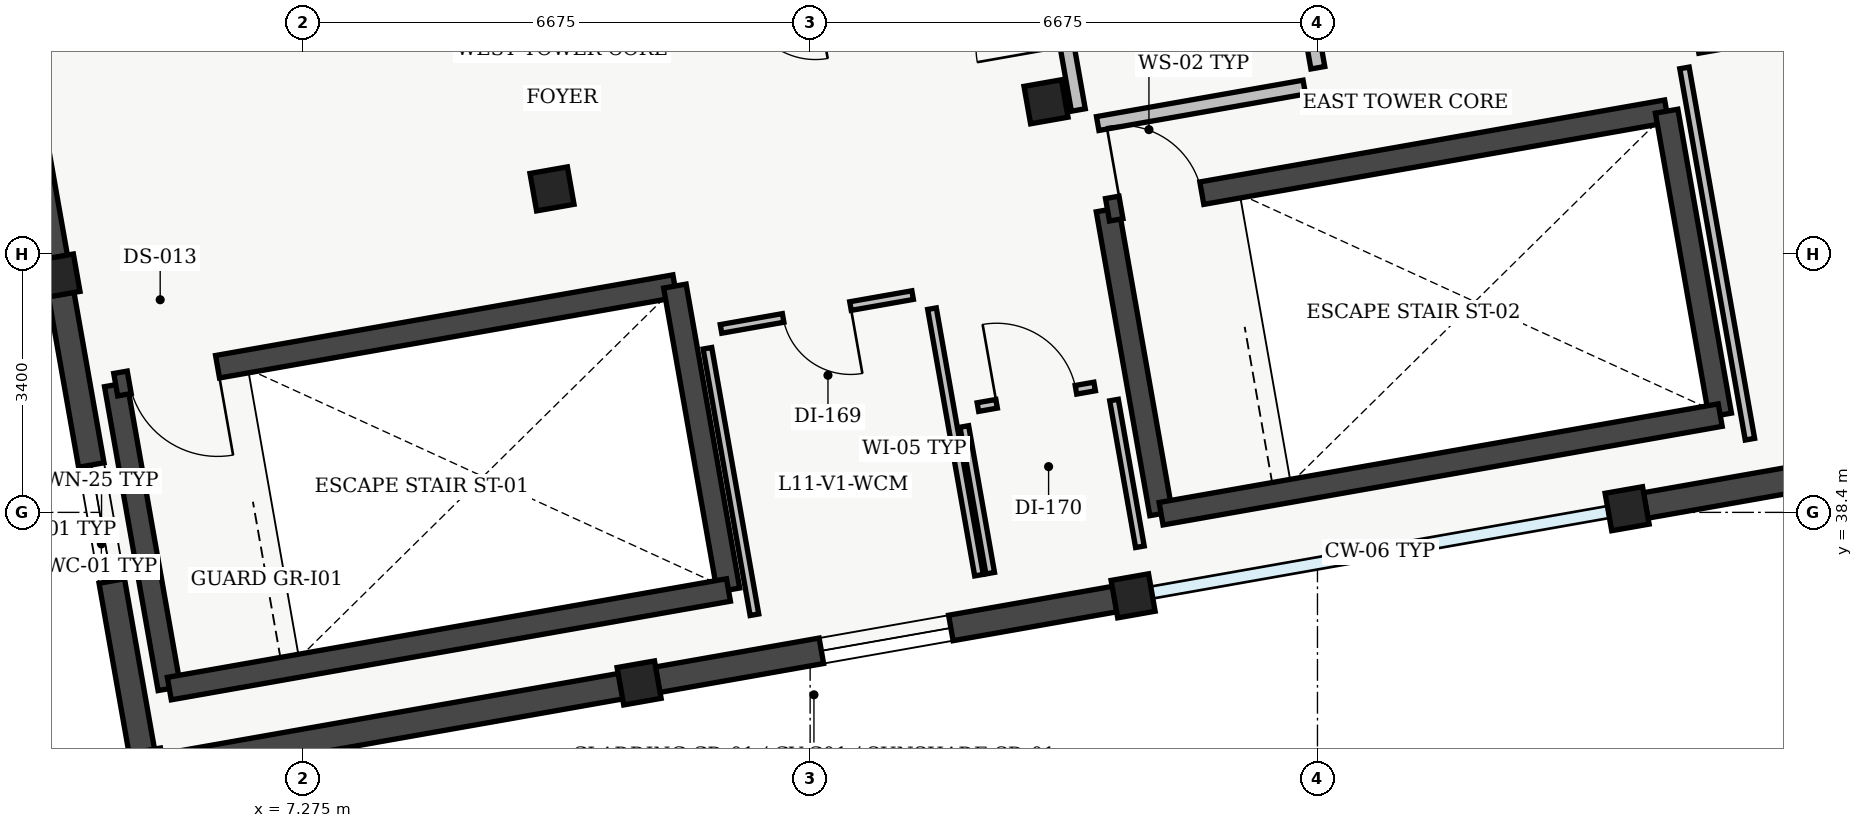
"""IFC4 building model, lengths in metres.
Left out: names, types, materials, properties, quantities, classifications, styles, units other than length and angle.
Written with IfcOpenShell. Run it as: python <this file> out.ifc"""

import sys

from ifc_helpers import new_model, si_unit, direction, frame, frame_2d, origin, origin_2d, place, context, subcontext, project, spatial, polyline, rectangle, outline, extrude, element, fill, save


model = new_model("IFC4")
c1 = context("Model", 3, precision=1e-05, world=origin(), true_north=direction((0.0, 1.0)))
c2 = subcontext(c1, "Body", "Model", "MODEL_VIEW")
j1 = project(units=[si_unit("LENGTHUNIT", "METRE"), si_unit("PLANEANGLEUNIT", "RADIAN")], contexts=[c1])
p1 = place(None, origin())
s1 = spatial("IfcSite", under=j1, at=p1, CompositionType="ELEMENT")
p2 = place(p1, origin())
s2 = spatial("IfcBuilding", under=s1, at=p2, CompositionType="ELEMENT")
p3 = place(p2, frame((0.0, 0.0, 49.2)))
s3 = spatial("IfcBuildingStorey", under=s2, at=p3, CompositionType="ELEMENT", Elevation=49.2)
p4 = place(p3, frame((4.054, 41.51, 0.0), z_axis=(0.0, 0.0, 1.0), x_axis=(0.984807753012, 0.173648177667, 0.0)))
e1 = element("IfcColumn", 1, at=p4, inside=s3, PredefinedType="COLUMN", context=c2, shape_type="SweptSolid", body=[
    extrude(rectangle(XDim=0.5, YDim=0.5, at=origin_2d()), origin(), (0.0, 0.0, 1.0), 4.2),
])
p5 = place(p3, frame((11.7, 36.156, 0.0), z_axis=(0.0, 0.0, 1.0), x_axis=(0.984807753012, 0.173648177667, 0.0)))
e2 = element("IfcColumn", 2, at=p5, inside=s3, PredefinedType="COLUMN", context=c2, shape_type="SweptSolid", body=[
    extrude(rectangle(XDim=0.5, YDim=0.5, at=origin_2d()), origin(), (0.0, 0.0, 1.0), 3.985),
])
p6 = place(p3, frame((10.554, 42.656, 0.0), z_axis=(0.0, 0.0, 1.0), x_axis=(0.984807753012, 0.173648177667, 0.0)))
e3 = element("IfcColumn", 3, at=p6, inside=s3, PredefinedType="COLUMN", context=c2, shape_type="SweptSolid", body=[
    extrude(rectangle(XDim=0.5, YDim=0.5, at=origin_2d()), origin(), (0.0, 0.0, 1.0), 4.2),
])
p7 = place(p3, frame((18.199, 37.302, 0.0), z_axis=(0.0, 0.0, 1.0), x_axis=(0.984807753012, 0.173648177667, 0.0)))
e4 = element("IfcColumn", 4, at=p7, inside=s3, PredefinedType="COLUMN", context=c2, shape_type="SweptSolid", body=[
    extrude(rectangle(XDim=0.5, YDim=0.5, at=origin_2d()), origin(), (0.0, 0.0, 1.0), 3.985),
])
p8 = place(p3, frame((17.053, 43.802, 0.0), z_axis=(0.0, 0.0, 1.0), x_axis=(0.984807753012, 0.173648177667, 0.0)))
e5 = element("IfcColumn", 5, at=p8, inside=s3, PredefinedType="COLUMN", context=c2, shape_type="SweptSolid", body=[
    extrude(rectangle(XDim=0.5, YDim=0.5, at=origin_2d()), origin(), (0.0, 0.0, 1.0), 4.2),
])
p9 = place(p3, frame((24.699, 38.448, 0.0), z_axis=(0.0, 0.0, 1.0), x_axis=(0.984807753012, 0.173648177667, 0.0)))
e6 = element("IfcColumn", 6, at=p9, inside=s3, PredefinedType="COLUMN", context=c2, shape_type="SweptSolid", body=[
    extrude(rectangle(XDim=0.5, YDim=0.5, at=origin_2d()), origin(), (0.0, 0.0, 1.0), 3.985),
])
p10 = place(p3, frame((5.157, 35.251, 0.0), z_axis=(0.0, 0.0, 1.0), x_axis=(-0.173650847905, 0.984807282173, 0.0)))
e7 = element("IfcWall", 7, at=p10, inside=s3, PredefinedType="SOLIDWALL", context=c2, shape_type="SweptSolid", body=[
    extrude(outline(polyline([(0.0, 0.0), (6.11, 0.0), (6.11, 5.234), (0.0, 4.0), (0.0, 0.0)])), frame((0.0, 0.17, 0.0), z_axis=(0.0, -1.0, 0.0), x_axis=(1.0, 0.0, 0.0)), (0.0, 0.0, 1.0), 0.34),
])
p11 = place(p10, frame((2.28, 0.0, 0.95)))
e8 = element("IfcOpeningElement", 8, at=p11, cuts=e7, PredefinedType="OPENING", context=c2, shape_type="SweptSolid", body=[
    extrude(rectangle(XDim=1.55, YDim=1.46, at=frame_2d((0.775, 0.73))), frame((0.0, 0.17, 0.0), z_axis=(0.0, -1.0, 0.0), x_axis=(1.0, 0.0, 0.0)), (0.0, 0.0, 1.0), 0.34),
])
p12 = place(p3, frame((4.011, 41.751, 0.0), z_axis=(0.0, 0.0, 1.0), x_axis=(-0.173657681232, 0.98480607723, 0.0)))
e9 = element("IfcWall", 9, at=p12, inside=s3, PredefinedType="SOLIDWALL", context=c2, shape_type="SweptSolid", body=[
    extrude(outline(polyline([(0.0, 0.0), (6.11, 0.0), (6.11, 6.567), (0.0, 5.333), (0.0, 0.0)])), frame((0.0, 0.17, 0.0), z_axis=(0.0, -1.0, 0.0), x_axis=(1.0, 0.0, 0.0)), (0.0, 0.0, 1.0), 0.34),
])
p13 = place(p12, frame((2.235, 0.0, 0.95)))
e10 = element("IfcOpeningElement", 10, at=p13, cuts=e9, PredefinedType="OPENING", context=c2, shape_type="SweptSolid", body=[
    extrude(rectangle(XDim=1.64, YDim=1.48, at=frame_2d((0.82, 0.74))), frame((0.0, 0.17, 0.0), z_axis=(0.0, -1.0, 0.0), x_axis=(1.0, 0.0, 0.0)), (0.0, 0.0, 1.0), 0.34),
])
p14 = place(p3, frame((30.958, 39.552, 0.0), z_axis=(0.0, 0.0, 1.0), x_axis=(-0.984807282173, -0.173650847905, 0.0)))
e11 = element("IfcWall", 11, at=p14, inside=s3, PredefinedType="SOLIDWALL", context=c2, shape_type="SweptSolid", body=[
    extrude(rectangle(XDim=6.11, YDim=0.34, at=frame_2d((3.055, 0.0))), origin(), (0.0, 0.0, 1.0), 3.47),
])
p15 = place(p14, frame((2.1, 0.0, 0.95)))
e12 = element("IfcOpeningElement", 12, at=p15, cuts=e11, PredefinedType="OPENING", context=c2, shape_type="SweptSolid", body=[
    extrude(rectangle(XDim=1.91, YDim=1.4, at=frame_2d((0.955, 0.7))), frame((0.0, 0.17, 0.0), z_axis=(0.0, -1.0, 0.0), x_axis=(1.0, 0.0, 0.0)), (0.0, 0.0, 1.0), 0.34),
])
p16 = place(p3, frame((17.958, 37.26, 0.0), z_axis=(0.0, 0.0, 1.0), x_axis=(-0.98481411452, -0.173612095898, 0.0)))
e13 = element("IfcWall", 13, at=p16, inside=s3, PredefinedType="SOLIDWALL", context=c2, shape_type="SweptSolid", body=[
    extrude(rectangle(XDim=6.11, YDim=0.34, at=frame_2d((3.055, 0.0))), origin(), (0.0, 0.0, 1.0), 3.47),
])
p17 = place(p16, frame((2.19, 0.0, 0.95)))
e14 = element("IfcOpeningElement", 14, at=p17, cuts=e13, PredefinedType="OPENING", context=c2, shape_type="SweptSolid", body=[
    extrude(rectangle(XDim=1.73, YDim=1.36, at=frame_2d((0.865, 0.68))), frame((0.0, 0.17, 0.0), z_axis=(0.0, -1.0, 0.0), x_axis=(1.0, 0.0, 0.0)), (0.0, 0.0, 1.0), 0.34),
])
p18 = place(p3, frame((11.458, 36.114, 0.0), z_axis=(0.0, 0.0, 1.0), x_axis=(-0.984807282173, -0.173650847905, 0.0)))
e15 = element("IfcWall", 15, at=p18, inside=s3, PredefinedType="SOLIDWALL", context=c2, shape_type="SweptSolid", body=[
    extrude(rectangle(XDim=6.11, YDim=0.34, at=frame_2d((3.055, 0.0))), origin(), (0.0, 0.0, 1.0), 3.47),
])
p19 = place(p3, frame((5.519, 36.082, 0.0), z_axis=(0.0, 0.0, 1.0), x_axis=(-0.173665267602, 0.984804739443, 0.0)))
e16 = element("IfcWall", 16, at=p19, inside=s3, PredefinedType="SHEAR", context=c2, shape_type="SweptSolid", body=[
    extrude(rectangle(XDim=4.06, YDim=0.3, at=frame_2d((2.03, 0.0))), origin(), (0.0, 0.0, 1.0), 3.98),
])
p20 = place(p3, frame((4.814, 40.08, 0.0), z_axis=(0.0, 0.0, 1.0), x_axis=(0.984802636214, 0.173677193974, 0.0)))
e17 = element("IfcWall", 17, at=p20, inside=s3, PredefinedType="SHEAR", context=c2, shape_type="SweptSolid", body=[
    extrude(rectangle(XDim=7.47, YDim=0.3, at=frame_2d((3.735, 0.0))), origin(), (0.0, 0.0, 1.0), 3.98),
])
p21 = place(p20, frame((0.18, 0.0, 0.0)))
e18 = element("IfcOpeningElement", 18, at=p21, cuts=e17, PredefinedType="OPENING", context=c2, shape_type="SweptSolid", body=[
    extrude(rectangle(XDim=1.18, YDim=2.15, at=frame_2d((0.59, 1.075))), frame((0.0, 0.15, 0.0), z_axis=(0.0, -1.0, 0.0), x_axis=(1.0, 0.0, 0.0)), (0.0, 0.0, 1.0), 0.3),
])
p22 = place(p3, frame((12.17, 41.377, 0.0), z_axis=(0.0, 0.0, 1.0), x_axis=(0.173654983803, -0.984806552883, 0.0)))
e19 = element("IfcWall", 19, at=p22, inside=s3, PredefinedType="SHEAR", context=c2, shape_type="SweptSolid", body=[
    extrude(rectangle(XDim=4.06, YDim=0.3, at=frame_2d((2.03, 0.0))), origin(), (0.0, 0.0, 1.0), 3.98),
])
p23 = place(p3, frame((12.875, 37.379, 0.0), z_axis=(0.0, 0.0, 1.0), x_axis=(-0.984808225754, -0.173645496596, 0.0)))
e20 = element("IfcWall", 20, at=p23, inside=s3, PredefinedType="SHEAR", context=c2, shape_type="SweptSolid", body=[
    extrude(rectangle(XDim=7.47, YDim=0.3, at=frame_2d((3.735, 0.0))), origin(), (0.0, 0.0, 1.0), 3.98),
])
p24 = place(p3, frame((18.567, 38.383, 0.0), z_axis=(0.0, 0.0, 1.0), x_axis=(-0.173606946886, 0.984815022221, 0.0)))
e21 = element("IfcWall", 21, at=p24, inside=s3, PredefinedType="SHEAR", context=c2, shape_type="SweptSolid", body=[
    extrude(rectangle(XDim=4.06, YDim=0.3, at=frame_2d((2.03, 0.0))), origin(), (0.0, 0.0, 1.0), 3.98),
])
p25 = place(p3, frame((17.863, 42.381, 0.0), z_axis=(0.0, 0.0, 1.0), x_axis=(0.984808225754, 0.173645496596, 0.0)))
e22 = element("IfcWall", 22, at=p25, inside=s3, PredefinedType="SHEAR", context=c2, shape_type="SweptSolid", body=[
    extrude(rectangle(XDim=7.47, YDim=0.3, at=frame_2d((3.735, 0.0))), origin(), (0.0, 0.0, 1.0), 3.98),
])
p26 = place(p25, frame((0.18, 0.0, 0.0)))
e23 = element("IfcOpeningElement", 23, at=p26, cuts=e22, PredefinedType="OPENING", context=c2, shape_type="SweptSolid", body=[
    extrude(rectangle(XDim=1.08, YDim=2.15, at=frame_2d((0.54, 1.075))), frame((0.0, 0.15, 0.0), z_axis=(0.0, -1.0, 0.0), x_axis=(1.0, 0.0, 0.0)), (0.0, 0.0, 1.0), 0.3),
])
p27 = place(p3, frame((25.219, 43.678, 0.0), z_axis=(0.0, 0.0, 1.0), x_axis=(0.173665267602, -0.984804739443, 0.0)))
e24 = element("IfcWall", 24, at=p27, inside=s3, PredefinedType="SHEAR", context=c2, shape_type="SweptSolid", body=[
    extrude(rectangle(XDim=4.06, YDim=0.3, at=frame_2d((2.03, 0.0))), origin(), (0.0, 0.0, 1.0), 3.98),
])
p28 = place(p3, frame((25.924, 39.68, 0.0), z_axis=(0.0, 0.0, 1.0), x_axis=(-0.984809211193, -0.173639907711, 0.0)))
e25 = element("IfcWall", 25, at=p28, inside=s3, PredefinedType="SHEAR", context=c2, shape_type="SweptSolid", body=[
    extrude(rectangle(XDim=7.47, YDim=0.3, at=frame_2d((3.735, 0.0))), origin(), (0.0, 0.0, 1.0), 3.98),
])
p29 = place(p3, frame((17.733, 43.516, 0.0), z_axis=(0.0, 0.0, 1.0), x_axis=(0.984808483292, 0.173644035992, 0.0)))
e26 = element("IfcWall", 26, at=p29, inside=s3, PredefinedType="SOLIDWALL", context=c2, shape_type="SweptSolid", body=[
    extrude(rectangle(XDim=2.76, YDim=0.185, at=frame_2d((1.38, 0.0))), origin(), (0.0, 0.0, 1.0), 3.65),
])
p30 = place(p3, frame((20.63, 44.25, 0.0), z_axis=(0.0, 0.0, 1.0), x_axis=(-0.173621956536, 0.984812376145, 0.0)))
e27 = element("IfcWall", 27, at=p30, inside=s3, PredefinedType="SOLIDWALL", context=c2, shape_type="SweptSolid", body=[
    extrude(rectangle(XDim=3.41, YDim=0.185, at=frame_2d((1.705, 0.0))), origin(), (0.0, 0.0, 1.0), 3.65),
])
p31 = place(p30, frame((0.85, 0.0, 0.0)))
e28 = element("IfcOpeningElement", 28, at=p31, cuts=e27, PredefinedType="OPENING", context=c2, shape_type="SweptSolid", body=[
    extrude(rectangle(XDim=1.2, YDim=2.15, at=frame_2d((0.6, 1.075))), frame((0.0, 0.093, 0.0), z_axis=(0.0, -1.0, 0.0), x_axis=(1.0, 0.0, 0.0)), (0.0, 0.0, 1.0), 0.185),
])
p32 = place(p3, frame((16.886, 47.052, 0.0), z_axis=(0.0, 0.0, 1.0), x_axis=(0.173621956536, -0.984812376145, 0.0)))
e29 = element("IfcWall", 29, at=p32, inside=s3, PredefinedType="SOLIDWALL", context=c2, shape_type="SweptSolid", body=[
    extrude(rectangle(XDim=3.41, YDim=0.185, at=frame_2d((1.705, 0.0))), origin(), (0.0, 0.0, 1.0), 3.65),
])
p33 = place(p32, frame((1.36, 0.0, 0.0)))
e30 = element("IfcOpeningElement", 30, at=p33, cuts=e29, PredefinedType="OPENING", context=c2, shape_type="SweptSolid", body=[
    extrude(rectangle(XDim=1.2, YDim=2.15, at=frame_2d((0.6, 1.075))), frame((0.0, 0.093, 0.0), z_axis=(0.0, -1.0, 0.0), x_axis=(1.0, 0.0, 0.0)), (0.0, 0.0, 1.0), 0.185),
])
p34 = place(p3, frame((16.171, 37.574, 0.0), z_axis=(0.0, 0.0, 1.0), x_axis=(-0.173644490041, 0.984808403233, 0.0)))
e31 = element("IfcWall", 31, at=p34, inside=s3, PredefinedType="PARTITIONING", context=c2, shape_type="SweptSolid", body=[
    extrude(rectangle(XDim=3.56, YDim=0.115, at=frame_2d((1.78, 0.0))), origin(), (0.0, 0.0, 1.0), 3.65),
])
p35 = place(p3, frame((15.298, 41.259, 0.0), z_axis=(0.0, 0.0, 1.0), x_axis=(-0.984803714572, -0.17367107924, 0.0)))
e32 = element("IfcWall", 32, at=p35, inside=s3, PredefinedType="PARTITIONING", context=c2, shape_type="SweptSolid", body=[
    extrude(rectangle(XDim=2.56, YDim=0.115, at=frame_2d((1.28, 0.0))), origin(), (0.0, 0.0, 1.0), 3.65),
])
p36 = place(p35, frame((0.83, 0.0, 0.0)))
e33 = element("IfcOpeningElement", 33, at=p36, cuts=e32, PredefinedType="OPENING", context=c2, shape_type="SweptSolid", body=[
    extrude(rectangle(XDim=0.9, YDim=2.1, at=frame_2d((0.45, 1.05))), frame((0.0, 0.058, 0.0), z_axis=(0.0, -1.0, 0.0), x_axis=(1.0, 0.0, 0.0)), (0.0, 0.0, 1.0), 0.115),
])
p37 = place(p3, frame((12.599, 40.559, 0.0), z_axis=(0.0, 0.0, 1.0), x_axis=(0.173644490041, -0.984808403233, 0.0)))
e34 = element("IfcWall", 34, at=p37, inside=s3, PredefinedType="PARTITIONING", context=c2, shape_type="SweptSolid", body=[
    extrude(rectangle(XDim=3.56, YDim=0.115, at=frame_2d((1.78, 0.0))), origin(), (0.0, 0.0, 1.0), 3.65),
])
p38 = place(p3, frame((18.289, 37.948, 0.0), z_axis=(0.0, 0.0, 1.0), x_axis=(-0.173643211285, 0.984808628706, 0.0)))
e35 = element("IfcWall", 35, at=p38, inside=s3, PredefinedType="PARTITIONING", context=c2, shape_type="SweptSolid", body=[
    extrude(rectangle(XDim=1.96, YDim=0.115, at=frame_2d((0.98, 0.0))), origin(), (0.0, 0.0, 1.0), 3.37),
])
p39 = place(p3, frame((17.694, 40.056, 0.0), z_axis=(0.0, 0.0, 1.0), x_axis=(-0.984797734253, -0.173704987291, 0.0)))
e36 = element("IfcWall", 36, at=p39, inside=s3, PredefinedType="PARTITIONING", context=c2, shape_type="SweptSolid", body=[
    extrude(rectangle(XDim=1.56, YDim=0.115, at=frame_2d((0.78, 0.0))), origin(), (0.0, 0.0, 1.0), 3.65),
])
p40 = place(p39, frame((0.25, 0.0, 0.0)))
e37 = element("IfcOpeningElement", 37, at=p40, cuts=e36, PredefinedType="OPENING", context=c2, shape_type="SweptSolid", body=[
    extrude(rectangle(XDim=1.06, YDim=2.12, at=frame_2d((0.53, 1.06))), frame((0.0, 0.058, 0.0), z_axis=(0.0, -1.0, 0.0), x_axis=(1.0, 0.0, 0.0)), (0.0, 0.0, 1.0), 0.115),
])
p41 = place(p3, frame((15.979, 39.53, 0.0), z_axis=(0.0, 0.0, 1.0), x_axis=(0.173643211285, -0.984808628706, 0.0)))
e38 = element("IfcWall", 38, at=p41, inside=s3, PredefinedType="PARTITIONING", context=c2, shape_type="SweptSolid", body=[
    extrude(rectangle(XDim=1.96, YDim=0.115, at=frame_2d((0.98, 0.0))), origin(), (0.0, 0.0, 1.0), 3.65),
])
p42 = place(p3, frame((29.581, 45.198, 0.0), z_axis=(0.0, 0.0, 1.0), x_axis=(-0.984810514369, -0.173632516505, 0.0)))
e39 = element("IfcWall", 39, at=p42, inside=s3, PredefinedType="PARTITIONING", context=c2, shape_type="SweptSolid", body=[
    extrude(rectangle(XDim=4.01, YDim=0.125, at=frame_2d((2.005, 0.0))), origin(), (0.0, 0.0, 1.0), 3.65),
])
p43 = place(p42, frame((1.535, 0.0, 0.0)))
e40 = element("IfcOpeningElement", 40, at=p43, cuts=e39, PredefinedType="OPENING", context=c2, shape_type="SweptSolid", body=[
    extrude(rectangle(XDim=0.94, YDim=2.12, at=frame_2d((0.47, 1.06))), frame((0.0, 0.062, 0.0), z_axis=(0.0, -1.0, 0.0), x_axis=(1.0, 0.0, 0.0)), (0.0, 0.0, 1.0), 0.125),
])
p44 = place(p3, frame((25.454, 44.247, 0.0), z_axis=(0.0, 0.0, 1.0), x_axis=(0.173658971256, -0.98480584975, 0.0)))
e41 = element("IfcWall", 41, at=p44, inside=s3, PredefinedType="PARTITIONING", context=c2, shape_type="SweptSolid", body=[
    extrude(rectangle(XDim=4.96, YDim=0.125, at=frame_2d((2.48, 0.0))), origin(), (0.0, 0.0, 1.0), 3.65),
])
p45 = place(p11, origin())
e42 = element("IfcWindow", 42, at=p45, inside=s3, PartitioningType="SINGLE_PANEL", PredefinedType="WINDOW", context=c2, shape_type="SweptSolid", body=[
    extrude(rectangle(XDim=1.55, YDim=1.46, at=frame_2d((0.775, 0.73))), frame((0.0, 0.03, 0.0), z_axis=(0.0, -1.0, 0.0), x_axis=(1.0, 0.0, 0.0)), (0.0, 0.0, 1.0), 0.06),
])
fill(e8, e42)
p46 = place(p17, origin())
e43 = element("IfcWindow", 43, at=p46, inside=s3, PartitioningType="SINGLE_PANEL", PredefinedType="WINDOW", context=c2, shape_type="SweptSolid", body=[
    extrude(rectangle(XDim=1.73, YDim=1.36, at=frame_2d((0.865, 0.68))), frame((0.0, 0.03, 0.0), z_axis=(0.0, -1.0, 0.0), x_axis=(1.0, 0.0, 0.0)), (0.0, 0.0, 1.0), 0.06),
])
fill(e14, e43)
p47 = place(p21, origin())
e44 = element("IfcDoor", 44, at=p47, inside=s3, OperationType="SINGLE_SWING_RIGHT", PredefinedType="DOOR", context=c2, shape_type="SweptSolid", body=[
    extrude(rectangle(XDim=1.18, YDim=2.15, at=frame_2d((0.59, 1.075))), frame((0.0, 0.025, 0.0), z_axis=(0.0, -1.0, 0.0), x_axis=(1.0, 0.0, 0.0)), (0.0, 0.0, 1.0), 0.05),
])
fill(e18, e44)
p48 = place(p26, origin())
e45 = element("IfcDoor", 45, at=p48, inside=s3, OperationType="SINGLE_SWING_LEFT", PredefinedType="DOOR", context=c2, shape_type="SweptSolid", body=[
    extrude(rectangle(XDim=1.08, YDim=2.15, at=frame_2d((0.54, 1.075))), frame((0.0, 0.025, 0.0), z_axis=(0.0, -1.0, 0.0), x_axis=(1.0, 0.0, 0.0)), (0.0, 0.0, 1.0), 0.05),
])
fill(e23, e45)
p49 = place(p36, origin())
e46 = element("IfcDoor", 46, at=p49, inside=s3, OperationType="SINGLE_SWING_LEFT", PredefinedType="DOOR", context=c2, shape_type="SweptSolid", body=[
    extrude(rectangle(XDim=0.9, YDim=2.1, at=frame_2d((0.45, 1.05))), frame((0.0, 0.025, 0.0), z_axis=(0.0, -1.0, 0.0), x_axis=(1.0, 0.0, 0.0)), (0.0, 0.0, 1.0), 0.05),
])
fill(e33, e46)
p50 = place(p40, origin())
e47 = element("IfcDoor", 47, at=p50, inside=s3, OperationType="SINGLE_SWING_RIGHT", PredefinedType="DOOR", context=c2, shape_type="SweptSolid", body=[
    extrude(rectangle(XDim=1.06, YDim=2.12, at=frame_2d((0.53, 1.06))), frame((0.0, 0.025, 0.0), z_axis=(0.0, -1.0, 0.0), x_axis=(1.0, 0.0, 0.0)), (0.0, 0.0, 1.0), 0.05),
])
fill(e37, e47)
save(model, sys.argv[1])
